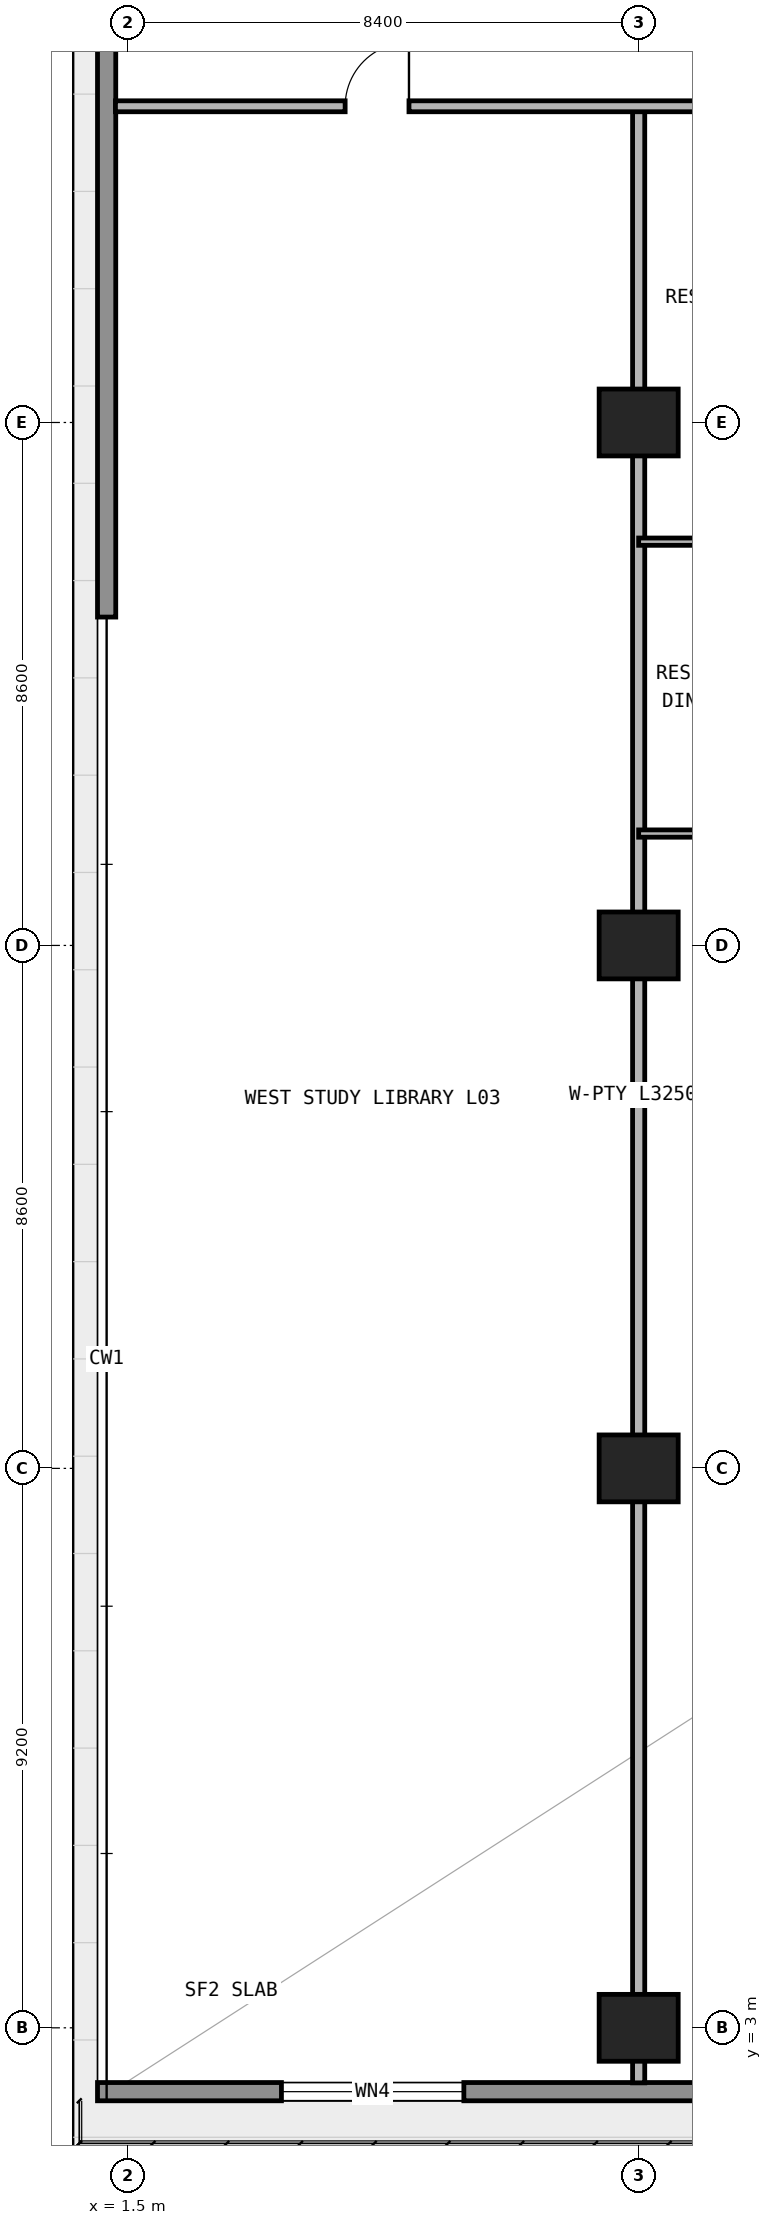
"""IFC4 building model, lengths in metres.
Left out: names, types, materials, properties, quantities, classifications, styles, units other than length and angle.
Written with IfcOpenShell. Run it as: python <this file> out.ifc"""

import sys

from ifc_helpers import new_model, si_unit, direction, frame, frame_2d, origin, origin_2d, place, context, subcontext, project, spatial, rectangle, extrude, element, fill, save


model = new_model("IFC4")
c1 = context("Model", 3, precision=1e-05, world=origin(), true_north=direction((0.0, 1.0)))
c2 = subcontext(c1, "Body", "Model", "MODEL_VIEW")
j1 = project(units=[si_unit("LENGTHUNIT", "METRE"), si_unit("PLANEANGLEUNIT", "RADIAN")], contexts=[c1])
p1 = place(None, origin())
s1 = spatial("IfcSite", under=j1, at=p1, CompositionType="ELEMENT")
p2 = place(p1, origin())
s2 = spatial("IfcBuilding", under=s1, at=p2, CompositionType="ELEMENT")
p3 = place(p2, frame((0.0, 0.0, 15.0)))
s3 = spatial("IfcBuildingStorey", under=s2, at=p3, CompositionType="ELEMENT", Elevation=15.0)
for number, where, z_axis, x_axis in (
    (1, (9.9, 3.0, 0.0), (0.0, 0.0, 1.0), (1.0, 0.0, 0.0)),
    (2, (9.9, 12.2, 0.0), (0.0, 0.0, 1.0), (1.0, 0.0, 0.0)),
    (3, (9.9, 20.8, 0.0), (0.0, 0.0, 1.0), (1.0, 0.0, 0.0)),
    (4, (9.9, 29.4, 0.0), (0.0, 0.0, 1.0), (1.0, 0.0, 0.0)),
):
    element("IfcColumn", number, at=place(p3, frame(where, z_axis=z_axis, x_axis=x_axis)), inside=s3, PredefinedType="COLUMN", context=c2, shape_type="SweptSolid", body=[
        extrude(rectangle(XDim=1.3, YDim=1.1, at=origin_2d()), origin(), (0.0, 0.0, 1.0), 4.5),
    ])
p4 = place(p3, frame((76.8, 1.95, 0.0), z_axis=(0.0, 0.0, 1.0), x_axis=(-1.0, 0.0, 0.0)))
e5 = element("IfcWall", 5, at=p4, inside=s3, PredefinedType="STANDARD", context=c2, shape_type="SweptSolid", body=[
    extrude(rectangle(XDim=75.8, YDim=0.3, at=frame_2d((37.9, 0.0))), origin(), (0.0, 0.0, 1.0), 4.5),
])
p5 = place(p4, frame((69.775, 0.0, 0.85)))
e6 = element("IfcOpeningElement", 6, at=p5, cuts=e5, PredefinedType="OPENING", context=c2, shape_type="SweptSolid", body=[
    extrude(rectangle(XDim=3.0, YDim=2.4, at=frame_2d((1.5, 1.2))), frame((0.0, 0.16, 0.0), z_axis=(0.0, -1.0, 0.0), x_axis=(1.0, 0.0, 0.0)), (0.0, 0.0, 1.0), 0.32),
])
p6 = place(p4, frame((61.8, 0.0, 0.0)))
e7 = element("IfcOpeningElement", 7, at=p6, cuts=e5, PredefinedType="OPENING", context=c2, shape_type="SweptSolid", body=[
    extrude(rectangle(XDim=1.8, YDim=2.3, at=frame_2d((0.9, 1.15))), frame((0.0, 0.16, 0.0), z_axis=(0.0, -1.0, 0.0), x_axis=(1.0, 0.0, 0.0)), (0.0, 0.0, 1.0), 0.32),
])
p7 = place(p4, frame((53.2, 0.0, 0.85)))
e8 = element("IfcOpeningElement", 8, at=p7, cuts=e5, PredefinedType="OPENING", context=c2, shape_type="SweptSolid", body=[
    extrude(rectangle(XDim=2.2, YDim=1.55, at=frame_2d((1.1, 0.775))), frame((0.0, 0.16, 0.0), z_axis=(0.0, -1.0, 0.0), x_axis=(1.0, 0.0, 0.0)), (0.0, 0.0, 1.0), 0.32),
])
p8 = place(p4, frame((45.0, 0.0, 0.0)))
e9 = element("IfcOpeningElement", 9, at=p8, cuts=e5, PredefinedType="OPENING", context=c2, shape_type="SweptSolid", body=[
    extrude(rectangle(XDim=1.8, YDim=2.3, at=frame_2d((0.9, 1.15))), frame((0.0, 0.16, 0.0), z_axis=(0.0, -1.0, 0.0), x_axis=(1.0, 0.0, 0.0)), (0.0, 0.0, 1.0), 0.32),
])
p9 = place(p4, frame((36.8, 0.0, 0.85)))
e10 = element("IfcOpeningElement", 10, at=p9, cuts=e5, PredefinedType="OPENING", context=c2, shape_type="SweptSolid", body=[
    extrude(rectangle(XDim=2.2, YDim=1.55, at=frame_2d((1.1, 0.775))), frame((0.0, 0.16, 0.0), z_axis=(0.0, -1.0, 0.0), x_axis=(1.0, 0.0, 0.0)), (0.0, 0.0, 1.0), 0.32),
])
p10 = place(p4, frame((28.8, 0.0, 0.85)))
e11 = element("IfcOpeningElement", 11, at=p10, cuts=e5, PredefinedType="OPENING", context=c2, shape_type="SweptSolid", body=[
    extrude(rectangle(XDim=2.2, YDim=1.55, at=frame_2d((1.1, 0.775))), frame((0.0, 0.16, 0.0), z_axis=(0.0, -1.0, 0.0), x_axis=(1.0, 0.0, 0.0)), (0.0, 0.0, 1.0), 0.32),
])
p11 = place(p4, frame((12.025, 0.0, 0.0)))
e12 = element("IfcOpeningElement", 12, at=p11, cuts=e5, PredefinedType="OPENING", context=c2, shape_type="SweptSolid", body=[
    extrude(rectangle(XDim=1.8, YDim=2.3, at=frame_2d((0.9, 1.15))), frame((0.0, 0.16, 0.0), z_axis=(0.0, -1.0, 0.0), x_axis=(1.0, 0.0, 0.0)), (0.0, 0.0, 1.0), 0.32),
])
p12 = place(p3, frame((1.15, 26.2, 0.0), z_axis=(0.0, 0.0, 1.0), x_axis=(0.0, 1.0, 0.0)))
e13 = element("IfcWall", 13, at=p12, inside=s3, PredefinedType="STANDARD", context=c2, shape_type="SweptSolid", body=[
    extrude(rectangle(XDim=24.4, YDim=0.3, at=frame_2d((12.2, 0.0))), origin(), (0.0, 0.0, 1.0), 4.5),
])
p13 = place(p3, frame((9.9, 2.095, 0.0), z_axis=(0.0, 0.0, 1.0), x_axis=(0.0, 1.0, 0.0)))
e14 = element("IfcWall", 14, at=p13, inside=s3, PredefinedType="PARTITIONING", context=c2, shape_type="SweptSolid", body=[
    extrude(rectangle(XDim=32.505, YDim=0.2, at=frame_2d((16.252, 0.0))), origin(), (0.0, 0.0, 1.0), 3.464),
])
p14 = place(p3, frame((9.9, 22.64, 0.0), z_axis=(0.0, 0.0, 1.0), x_axis=(1.0, 0.0, 0.0)))
e15 = element("IfcWall", 15, at=p14, inside=s3, PredefinedType="PARTITIONING", context=c2, shape_type="SweptSolid", body=[
    extrude(rectangle(XDim=8.4, YDim=0.12, at=frame_2d((4.2, 0.0))), origin(), (0.0, 0.0, 1.0), 4.5),
])
p15 = place(p14, frame((1.44, 0.0, 0.0)))
e16 = element("IfcOpeningElement", 16, at=p15, cuts=e15, PredefinedType="OPENING", context=c2, shape_type="SweptSolid", body=[
    extrude(rectangle(XDim=0.9, YDim=2.15, at=frame_2d((0.45, 1.075))), frame((0.0, 0.07, 0.0), z_axis=(0.0, -1.0, 0.0), x_axis=(1.0, 0.0, 0.0)), (0.0, 0.0, 1.0), 0.14),
])
p16 = place(p3, frame((9.9, 27.44, 0.0), z_axis=(0.0, 0.0, 1.0), x_axis=(1.0, 0.0, 0.0)))
e17 = element("IfcWall", 17, at=p16, inside=s3, PredefinedType="PARTITIONING", context=c2, shape_type="SweptSolid", body=[
    extrude(rectangle(XDim=8.4, YDim=0.12, at=frame_2d((4.2, 0.0))), origin(), (0.0, 0.0, 1.0), 4.5),
])
p17 = place(p16, frame((1.44, 0.0, 0.0)))
e18 = element("IfcOpeningElement", 18, at=p17, cuts=e17, PredefinedType="OPENING", context=c2, shape_type="SweptSolid", body=[
    extrude(rectangle(XDim=0.9, YDim=2.15, at=frame_2d((0.45, 1.075))), frame((0.0, 0.07, 0.0), z_axis=(0.0, -1.0, 0.0), x_axis=(1.0, 0.0, 0.0)), (0.0, 0.0, 1.0), 0.14),
])
p18 = place(p3, frame((1.295, 34.6, 0.0), z_axis=(0.0, 0.0, 1.0), x_axis=(1.0, 0.0, 0.0)))
e19 = element("IfcWall", 19, at=p18, inside=s3, PredefinedType="PARTITIONING", context=c2, shape_type="SweptSolid", body=[
    extrude(rectangle(XDim=75.21, YDim=0.18, at=frame_2d((37.605, 0.0))), origin(), (0.0, 0.0, 1.0), 4.5),
])
p19 = place(p18, frame((3.778, 0.0, 0.0)))
e20 = element("IfcOpeningElement", 20, at=p19, cuts=e19, PredefinedType="OPENING", context=c2, shape_type="SweptSolid", body=[
    extrude(rectangle(XDim=1.05, YDim=2.15, at=frame_2d((0.525, 1.075))), frame((0.0, 0.1, 0.0), z_axis=(0.0, -1.0, 0.0), x_axis=(1.0, 0.0, 0.0)), (0.0, 0.0, 1.0), 0.2),
])
p20 = place(p18, frame((11.555, 0.0, 0.0)))
e21 = element("IfcOpeningElement", 21, at=p20, cuts=e19, PredefinedType="OPENING", context=c2, shape_type="SweptSolid", body=[
    extrude(rectangle(XDim=1.0, YDim=2.2, at=frame_2d((0.5, 1.1))), frame((0.0, 0.1, 0.0), z_axis=(0.0, -1.0, 0.0), x_axis=(1.0, 0.0, 0.0)), (0.0, 0.0, 1.0), 0.2),
])
p21 = place(p18, frame((28.263, 0.0, 0.0)))
e22 = element("IfcOpeningElement", 22, at=p21, cuts=e19, PredefinedType="OPENING", context=c2, shape_type="SweptSolid", body=[
    extrude(rectangle(XDim=1.0, YDim=2.2, at=frame_2d((0.5, 1.1))), frame((0.0, 0.1, 0.0), z_axis=(0.0, -1.0, 0.0), x_axis=(1.0, 0.0, 0.0)), (0.0, 0.0, 1.0), 0.2),
])
p22 = place(p18, frame((61.982, 0.0, 0.0)))
e23 = element("IfcOpeningElement", 23, at=p22, cuts=e19, PredefinedType="OPENING", context=c2, shape_type="SweptSolid", body=[
    extrude(rectangle(XDim=1.05, YDim=2.15, at=frame_2d((0.525, 1.075))), frame((0.0, 0.1, 0.0), z_axis=(0.0, -1.0, 0.0), x_axis=(1.0, 0.0, 0.0)), (0.0, 0.0, 1.0), 0.2),
])
p23 = place(p5, origin())
e24 = element("IfcWindow", 24, at=p23, inside=s3, PartitioningType="SINGLE_PANEL", PredefinedType="WINDOW", context=c2, shape_type="SweptSolid", body=[
    extrude(rectangle(XDim=3.0, YDim=2.4, at=frame_2d((1.5, 1.2))), frame((0.0, 0.03, 0.0), z_axis=(0.0, -1.0, 0.0), x_axis=(1.0, 0.0, 0.0)), (0.0, 0.0, 1.0), 0.06),
])
fill(e6, e24)
p24 = place(p19, origin())
e25 = element("IfcDoor", 25, at=p24, inside=s3, OperationType="SINGLE_SWING_RIGHT", PredefinedType="DOOR", context=c2, shape_type="SweptSolid", body=[
    extrude(rectangle(XDim=1.05, YDim=2.15, at=frame_2d((0.525, 1.075))), frame((0.0, 0.025, 0.0), z_axis=(0.0, -1.0, 0.0), x_axis=(1.0, 0.0, 0.0)), (0.0, 0.0, 1.0), 0.05),
])
fill(e20, e25)
save(model, sys.argv[1])
